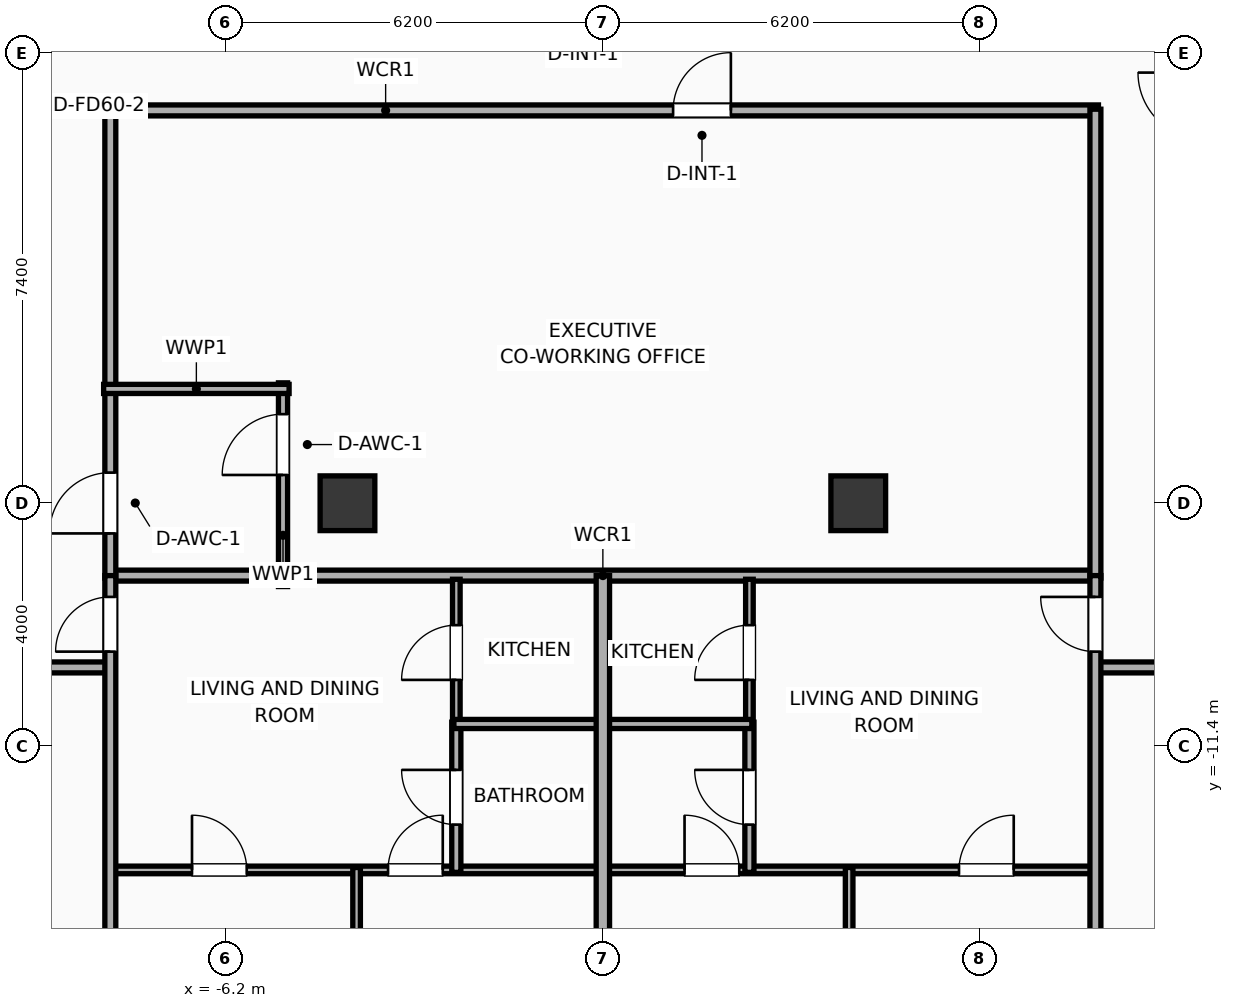
"""IFC4 building model, lengths in metres.
Left out: names, types, materials, properties, quantities, classifications, styles, units other than length and angle.
Written with IfcOpenShell. Run it as: python <this file> out.ifc"""

import sys

from ifc_helpers import new_model, si_unit, direction, frame, frame_2d, origin, origin_2d, place, context, subcontext, project, spatial, rectangle, extrude, element, fill, save


model = new_model("IFC4")
c1 = context("Model", 3, precision=1e-05, world=origin(), true_north=direction((0.0, 1.0)))
c2 = subcontext(c1, "Body", "Model", "MODEL_VIEW")
j1 = project(units=[si_unit("LENGTHUNIT", "METRE"), si_unit("PLANEANGLEUNIT", "RADIAN")], contexts=[c1])
p1 = place(None, origin())
s1 = spatial("IfcSite", under=j1, at=p1, CompositionType="ELEMENT")
p2 = place(p1, origin())
s2 = spatial("IfcBuilding", under=s1, at=p2, CompositionType="ELEMENT")
p3 = place(p2, frame((0.0, 0.0, 191.1)))
s3 = spatial("IfcBuildingStorey", under=s2, at=p3, CompositionType="ELEMENT", Elevation=191.1)
for number, where, z_axis, x_axis in (
    (1, (-4.2, -7.4, 0.0), (0.0, 0.0, 1.0), (1.0, 0.0, 0.0)),
    (2, (4.2, -7.4, 0.0), (0.0, 0.0, 1.0), (1.0, 0.0, 0.0)),
):
    element("IfcColumn", number, at=place(p3, frame(where, z_axis=z_axis, x_axis=x_axis)), inside=s3, PredefinedType="COLUMN", context=c2, shape_type="SweptSolid", body=[
        extrude(rectangle(XDim=0.9, YDim=0.9, at=origin_2d()), origin(), (0.0, 0.0, 1.0), 3.9),
    ])
p4 = place(p3, frame((-8.15, -8.59, 0.0), z_axis=(0.0, 0.0, 1.0), x_axis=(1.0, 0.0, 0.0)))
e3 = element("IfcWall", 3, at=p4, inside=s3, PredefinedType="PARTITIONING", context=c2, shape_type="SweptSolid", body=[
    extrude(rectangle(XDim=16.3, YDim=0.18, at=frame_2d((8.15, 0.0))), origin(), (0.0, 0.0, 1.0), 3.5),
])
p5 = place(p3, frame((-8.15, -0.94, 0.0), z_axis=(0.0, 0.0, 1.0), x_axis=(1.0, 0.0, 0.0)))
e4 = element("IfcWall", 4, at=p5, inside=s3, PredefinedType="PARTITIONING", context=c2, shape_type="SweptSolid", body=[
    extrude(rectangle(XDim=16.3, YDim=0.18, at=frame_2d((8.15, 0.0))), origin(), (0.0, 0.0, 1.0), 3.5),
])
p6 = place(p5, frame((9.305, 0.0, 0.0)))
e5 = element("IfcOpeningElement", 5, at=p6, cuts=e4, PredefinedType="OPENING", context=c2, shape_type="SweptSolid", body=[
    extrude(rectangle(XDim=0.95, YDim=2.05, at=frame_2d((0.475, 1.025))), frame((0.0, 0.1, 0.0), z_axis=(0.0, -1.0, 0.0), x_axis=(1.0, 0.0, 0.0)), (0.0, 0.0, 1.0), 0.2),
])
p7 = place(p3, frame((-8.1, -8.63, 0.0), z_axis=(0.0, 0.0, 1.0), x_axis=(0.0, 1.0, 0.0)))
e6 = element("IfcWall", 6, at=p7, inside=s3, PredefinedType="PARTITIONING", context=c2, shape_type="SweptSolid", body=[
    extrude(rectangle(XDim=7.71, YDim=0.18, at=frame_2d((3.855, 0.0))), origin(), (0.0, 0.0, 1.0), 3.5),
])
p8 = place(p7, frame((0.734, 0.0, 0.0)))
e7 = element("IfcOpeningElement", 7, at=p8, cuts=e6, PredefinedType="OPENING", context=c2, shape_type="SweptSolid", body=[
    extrude(rectangle(XDim=1.0, YDim=2.05, at=frame_2d((0.5, 1.025))), frame((0.0, 0.1, 0.0), z_axis=(0.0, -1.0, 0.0), x_axis=(1.0, 0.0, 0.0)), (0.0, 0.0, 1.0), 0.2),
])
p9 = place(p3, frame((8.1, -8.63, 0.0), z_axis=(0.0, 0.0, 1.0), x_axis=(0.0, 1.0, 0.0)))
e8 = element("IfcWall", 8, at=p9, inside=s3, PredefinedType="PARTITIONING", context=c2, shape_type="SweptSolid", body=[
    extrude(rectangle(XDim=7.71, YDim=0.18, at=frame_2d((3.855, 0.0))), origin(), (0.0, 0.0, 1.0), 3.5),
])
p10 = place(p3, frame((-5.26, -8.77, 0.0), z_axis=(0.0, 0.0, 1.0), x_axis=(0.0, 1.0, 0.0)))
e9 = element("IfcWall", 9, at=p10, inside=s3, PredefinedType="PLUMBINGWALL", context=c2, shape_type="SweptSolid", body=[
    extrude(rectangle(XDim=3.35, YDim=0.15, at=frame_2d((1.675, 0.0))), origin(), (0.0, 0.0, 1.0), 3.5),
])
p11 = place(p10, frame((1.835, 0.0, 0.0)))
e10 = element("IfcOpeningElement", 10, at=p11, cuts=e9, PredefinedType="OPENING", context=c2, shape_type="SweptSolid", body=[
    extrude(rectangle(XDim=1.0, YDim=2.05, at=frame_2d((0.5, 1.025))), frame((0.0, 0.085, 0.0), z_axis=(0.0, -1.0, 0.0), x_axis=(1.0, 0.0, 0.0)), (0.0, 0.0, 1.0), 0.17),
])
p12 = place(p3, frame((-8.21, -5.52, 0.0), z_axis=(0.0, 0.0, 1.0), x_axis=(1.0, 0.0, 0.0)))
e11 = element("IfcWall", 11, at=p12, inside=s3, PredefinedType="PLUMBINGWALL", context=c2, shape_type="SweptSolid", body=[
    extrude(rectangle(XDim=3.05, YDim=0.15, at=frame_2d((1.525, 0.0))), origin(), (0.0, 0.0, 1.0), 3.5),
])
p13 = place(p3, frame((-19.5, -10.1, 0.0), z_axis=(0.0, 0.0, 1.0), x_axis=(1.0, 0.0, 0.0)))
e12 = element("IfcWall", 12, at=p13, inside=s3, PredefinedType="PARTITIONING", context=c2, shape_type="SweptSolid", body=[
    extrude(rectangle(XDim=11.42, YDim=0.18, at=frame_2d((5.71, 0.0))), origin(), (0.0, 0.0, 1.0), 3.5),
])
p14 = place(p13, frame((2.623, 0.0, 0.0)))
e13 = element("IfcOpeningElement", 13, at=p14, cuts=e12, PredefinedType="OPENING", context=c2, shape_type="SweptSolid", body=[
    extrude(rectangle(XDim=0.9, YDim=2.05, at=frame_2d((0.45, 1.025))), frame((0.0, 0.1, 0.0), z_axis=(0.0, -1.0, 0.0), x_axis=(1.0, 0.0, 0.0)), (0.0, 0.0, 1.0), 0.2),
])
p15 = place(p13, frame((9.189, 0.0, 0.0)))
e14 = element("IfcOpeningElement", 14, at=p15, cuts=e12, PredefinedType="OPENING", context=c2, shape_type="SweptSolid", body=[
    extrude(rectangle(XDim=1.15, YDim=2.05, at=frame_2d((0.575, 1.025))), frame((0.0, 0.1, 0.0), z_axis=(0.0, -1.0, 0.0), x_axis=(1.0, 0.0, 0.0)), (0.0, 0.0, 1.0), 0.2),
])
p16 = place(p3, frame((8.08, -10.1, 0.0), z_axis=(0.0, 0.0, 1.0), x_axis=(1.0, 0.0, 0.0)))
e15 = element("IfcWall", 15, at=p16, inside=s3, PredefinedType="PARTITIONING", context=c2, shape_type="SweptSolid", body=[
    extrude(rectangle(XDim=11.42, YDim=0.18, at=frame_2d((5.71, 0.0))), origin(), (0.0, 0.0, 1.0), 3.5),
])
p17 = place(p16, frame((1.175, 0.0, 0.0)))
e16 = element("IfcOpeningElement", 16, at=p17, cuts=e15, PredefinedType="OPENING", context=c2, shape_type="SweptSolid", body=[
    extrude(rectangle(XDim=1.15, YDim=2.05, at=frame_2d((0.575, 1.025))), frame((0.0, 0.1, 0.0), z_axis=(0.0, -1.0, 0.0), x_axis=(1.0, 0.0, 0.0)), (0.0, 0.0, 1.0), 0.2),
])
p18 = place(p16, frame((6.87, 0.0, 0.0)))
e17 = element("IfcOpeningElement", 17, at=p18, cuts=e15, PredefinedType="OPENING", context=c2, shape_type="SweptSolid", body=[
    extrude(rectangle(XDim=1.15, YDim=2.05, at=frame_2d((0.575, 1.025))), frame((0.0, 0.1, 0.0), z_axis=(0.0, -1.0, 0.0), x_axis=(1.0, 0.0, 0.0)), (0.0, 0.0, 1.0), 0.2),
])
p19 = place(p3, frame((-8.08, -13.43, 0.0), z_axis=(0.0, 0.0, 1.0), x_axis=(1.0, 0.0, 0.0)))
e18 = element("IfcWall", 18, at=p19, inside=s3, PredefinedType="PARTITIONING", context=c2, shape_type="SweptSolid", body=[
    extrude(rectangle(XDim=8.06, YDim=0.125, at=frame_2d((4.03, 0.0))), origin(), (0.0, 0.0, 1.0), 3.5),
])
p20 = place(p19, frame((1.323, 0.0, 0.0)))
e19 = element("IfcOpeningElement", 19, at=p20, cuts=e18, PredefinedType="OPENING", context=c2, shape_type="SweptSolid", body=[
    extrude(rectangle(XDim=0.9, YDim=2.05, at=frame_2d((0.45, 1.025))), frame((0.0, 0.073, 0.0), z_axis=(0.0, -1.0, 0.0), x_axis=(1.0, 0.0, 0.0)), (0.0, 0.0, 1.0), 0.145),
])
p21 = place(p19, frame((4.547, 0.0, 0.0)))
e20 = element("IfcOpeningElement", 20, at=p21, cuts=e18, PredefinedType="OPENING", context=c2, shape_type="SweptSolid", body=[
    extrude(rectangle(XDim=0.9, YDim=2.05, at=frame_2d((0.45, 1.025))), frame((0.0, 0.073, 0.0), z_axis=(0.0, -1.0, 0.0), x_axis=(1.0, 0.0, 0.0)), (0.0, 0.0, 1.0), 0.145),
])
p22 = place(p3, frame((-2.41, -11.06, 0.0), z_axis=(0.0, 0.0, 1.0), x_axis=(0.0, 1.0, 0.0)))
e21 = element("IfcWall", 21, at=p22, inside=s3, PredefinedType="PARTITIONING", context=c2, shape_type="SweptSolid", body=[
    extrude(rectangle(XDim=2.41, YDim=0.125, at=frame_2d((1.205, 0.0))), origin(), (0.0, 0.0, 1.0), 3.5),
])
p23 = place(p22, frame((0.755, 0.0, 0.0)))
e22 = element("IfcOpeningElement", 22, at=p23, cuts=e21, PredefinedType="OPENING", context=c2, shape_type="SweptSolid", body=[
    extrude(rectangle(XDim=0.9, YDim=2.05, at=frame_2d((0.45, 1.025))), frame((0.0, 0.073, 0.0), z_axis=(0.0, -1.0, 0.0), x_axis=(1.0, 0.0, 0.0)), (0.0, 0.0, 1.0), 0.145),
])
p24 = place(p3, frame((-2.41, -13.47, 0.0), z_axis=(0.0, 0.0, 1.0), x_axis=(0.0, 1.0, 0.0)))
e23 = element("IfcWall", 23, at=p24, inside=s3, PredefinedType="PLUMBINGWALL", context=c2, shape_type="SweptSolid", body=[
    extrude(rectangle(XDim=2.47, YDim=0.15, at=frame_2d((1.235, 0.0))), origin(), (0.0, 0.0, 1.0), 3.5),
])
p25 = place(p24, frame((0.785, 0.0, 0.0)))
e24 = element("IfcOpeningElement", 24, at=p25, cuts=e23, PredefinedType="OPENING", context=c2, shape_type="SweptSolid", body=[
    extrude(rectangle(XDim=0.9, YDim=2.05, at=frame_2d((0.45, 1.025))), frame((0.0, 0.085, 0.0), z_axis=(0.0, -1.0, 0.0), x_axis=(1.0, 0.0, 0.0)), (0.0, 0.0, 1.0), 0.17),
])
p26 = place(p3, frame((-2.45, -11.03, 0.0), z_axis=(0.0, 0.0, 1.0), x_axis=(1.0, 0.0, 0.0)))
e25 = element("IfcWall", 25, at=p26, inside=s3, PredefinedType="PLUMBINGWALL", context=c2, shape_type="SweptSolid", body=[
    extrude(rectangle(XDim=2.43, YDim=0.15, at=frame_2d((1.215, 0.0))), origin(), (0.0, 0.0, 1.0), 3.5),
])
p27 = place(p3, frame((-4.05, -21.031, 0.0), z_axis=(0.0, 0.0, 1.0), x_axis=(0.0, 1.0, 0.0)))
e26 = element("IfcWall", 26, at=p27, inside=s3, PredefinedType="PARTITIONING", context=c2, shape_type="SweptSolid", body=[
    extrude(rectangle(XDim=7.641, YDim=0.125, at=frame_2d((3.82, 0.0))), origin(), (0.0, 0.0, 1.0), 2.39),
])
p28 = place(p3, frame((-8.1, -21.456, 0.0), z_axis=(0.0, 0.0, 1.0), x_axis=(0.0, 1.0, 0.0)))
e27 = element("IfcWall", 27, at=p28, inside=s3, PredefinedType="PARTITIONING", context=c2, shape_type="SweptSolid", body=[
    extrude(rectangle(XDim=12.866, YDim=0.18, at=frame_2d((6.433, 0.0))), origin(), (0.0, 0.0, 1.0), 3.5),
])
p29 = place(p28, frame((11.616, 0.0, 0.0)))
e28 = element("IfcOpeningElement", 28, at=p29, cuts=e27, PredefinedType="OPENING", context=c2, shape_type="SweptSolid", body=[
    extrude(rectangle(XDim=0.9, YDim=2.05, at=frame_2d((0.45, 1.025))), frame((0.0, 0.1, 0.0), z_axis=(0.0, -1.0, 0.0), x_axis=(1.0, 0.0, 0.0)), (0.0, 0.0, 1.0), 0.2),
])
p30 = place(p3, frame((0.02, -13.43, 0.0), z_axis=(0.0, 0.0, 1.0), x_axis=(1.0, 0.0, 0.0)))
e29 = element("IfcWall", 29, at=p30, inside=s3, PredefinedType="PARTITIONING", context=c2, shape_type="SweptSolid", body=[
    extrude(rectangle(XDim=8.06, YDim=0.125, at=frame_2d((4.03, 0.0))), origin(), (0.0, 0.0, 1.0), 3.5),
])
p31 = place(p30, frame((1.323, 0.0, 0.0)))
e30 = element("IfcOpeningElement", 30, at=p31, cuts=e29, PredefinedType="OPENING", context=c2, shape_type="SweptSolid", body=[
    extrude(rectangle(XDim=0.9, YDim=2.05, at=frame_2d((0.45, 1.025))), frame((0.0, 0.073, 0.0), z_axis=(0.0, -1.0, 0.0), x_axis=(1.0, 0.0, 0.0)), (0.0, 0.0, 1.0), 0.145),
])
p32 = place(p30, frame((5.837, 0.0, 0.0)))
e31 = element("IfcOpeningElement", 31, at=p32, cuts=e29, PredefinedType="OPENING", context=c2, shape_type="SweptSolid", body=[
    extrude(rectangle(XDim=0.9, YDim=2.05, at=frame_2d((0.45, 1.025))), frame((0.0, 0.073, 0.0), z_axis=(0.0, -1.0, 0.0), x_axis=(1.0, 0.0, 0.0)), (0.0, 0.0, 1.0), 0.145),
])
p33 = place(p3, frame((2.41, -11.06, 0.0), z_axis=(0.0, 0.0, 1.0), x_axis=(0.0, 1.0, 0.0)))
e32 = element("IfcWall", 32, at=p33, inside=s3, PredefinedType="PARTITIONING", context=c2, shape_type="SweptSolid", body=[
    extrude(rectangle(XDim=2.41, YDim=0.125, at=frame_2d((1.205, 0.0))), origin(), (0.0, 0.0, 1.0), 3.5),
])
p34 = place(p33, frame((0.755, 0.0, 0.0)))
e33 = element("IfcOpeningElement", 33, at=p34, cuts=e32, PredefinedType="OPENING", context=c2, shape_type="SweptSolid", body=[
    extrude(rectangle(XDim=0.9, YDim=2.05, at=frame_2d((0.45, 1.025))), frame((0.0, 0.073, 0.0), z_axis=(0.0, -1.0, 0.0), x_axis=(1.0, 0.0, 0.0)), (0.0, 0.0, 1.0), 0.145),
])
p35 = place(p3, frame((2.41, -13.47, 0.0), z_axis=(0.0, 0.0, 1.0), x_axis=(0.0, 1.0, 0.0)))
e34 = element("IfcWall", 34, at=p35, inside=s3, PredefinedType="PLUMBINGWALL", context=c2, shape_type="SweptSolid", body=[
    extrude(rectangle(XDim=2.47, YDim=0.15, at=frame_2d((1.235, 0.0))), origin(), (0.0, 0.0, 1.0), 3.5),
])
p36 = place(p35, frame((0.785, 0.0, 0.0)))
e35 = element("IfcOpeningElement", 35, at=p36, cuts=e34, PredefinedType="OPENING", context=c2, shape_type="SweptSolid", body=[
    extrude(rectangle(XDim=0.9, YDim=2.05, at=frame_2d((0.45, 1.025))), frame((0.0, 0.085, 0.0), z_axis=(0.0, -1.0, 0.0), x_axis=(1.0, 0.0, 0.0)), (0.0, 0.0, 1.0), 0.17),
])
p37 = place(p3, frame((0.02, -11.03, 0.0), z_axis=(0.0, 0.0, 1.0), x_axis=(1.0, 0.0, 0.0)))
e36 = element("IfcWall", 36, at=p37, inside=s3, PredefinedType="PLUMBINGWALL", context=c2, shape_type="SweptSolid", body=[
    extrude(rectangle(XDim=2.43, YDim=0.15, at=frame_2d((1.215, 0.0))), origin(), (0.0, 0.0, 1.0), 3.5),
])
p38 = place(p3, frame((4.05, -20.179, 0.0), z_axis=(0.0, 0.0, 1.0), x_axis=(0.0, 1.0, 0.0)))
e37 = element("IfcWall", 37, at=p38, inside=s3, PredefinedType="PARTITIONING", context=c2, shape_type="SweptSolid", body=[
    extrude(rectangle(XDim=6.79, YDim=0.125, at=frame_2d((3.395, 0.0))), origin(), (0.0, 0.0, 1.0), 2.39),
])
p39 = place(p3, frame((8.1, -19.754, 0.0), z_axis=(0.0, 0.0, 1.0), x_axis=(0.0, 1.0, 0.0)))
e38 = element("IfcWall", 38, at=p39, inside=s3, PredefinedType="PARTITIONING", context=c2, shape_type="SweptSolid", body=[
    extrude(rectangle(XDim=11.164, YDim=0.18, at=frame_2d((5.582, 0.0))), origin(), (0.0, 0.0, 1.0), 3.5),
])
p40 = place(p39, frame((9.913, 0.0, 0.0)))
e39 = element("IfcOpeningElement", 39, at=p40, cuts=e38, PredefinedType="OPENING", context=c2, shape_type="SweptSolid", body=[
    extrude(rectangle(XDim=0.9, YDim=2.05, at=frame_2d((0.45, 1.025))), frame((0.0, 0.1, 0.0), z_axis=(0.0, -1.0, 0.0), x_axis=(1.0, 0.0, 0.0)), (0.0, 0.0, 1.0), 0.2),
])
p41 = place(p3, frame((0.0, -20.605, 0.0), z_axis=(0.0, 0.0, 1.0), x_axis=(0.0, 1.0, 0.0)))
e40 = element("IfcWall", 40, at=p41, inside=s3, PredefinedType="PARTITIONING", context=c2, shape_type="SweptSolid", body=[
    extrude(rectangle(XDim=12.015, YDim=0.22, at=frame_2d((6.007, 0.0))), origin(), (0.0, 0.0, 1.0), 3.5),
])
p42 = place(p6, origin())
e41 = element("IfcDoor", 41, at=p42, inside=s3, OperationType="SINGLE_SWING_RIGHT", PredefinedType="DOOR", context=c2, shape_type="SweptSolid", body=[
    extrude(rectangle(XDim=0.95, YDim=2.05, at=frame_2d((0.475, 1.025))), frame((0.0, 0.025, 0.0), z_axis=(0.0, -1.0, 0.0), x_axis=(1.0, 0.0, 0.0)), (0.0, 0.0, 1.0), 0.05),
])
fill(e5, e41)
p43 = place(p8, origin())
e42 = element("IfcDoor", 42, at=p43, inside=s3, OperationType="SINGLE_SWING_LEFT", PredefinedType="DOOR", context=c2, shape_type="SweptSolid", body=[
    extrude(rectangle(XDim=1.0, YDim=2.05, at=frame_2d((0.5, 1.025))), frame((0.0, 0.025, 0.0), z_axis=(0.0, -1.0, 0.0), x_axis=(1.0, 0.0, 0.0)), (0.0, 0.0, 1.0), 0.05),
])
fill(e7, e42)
p44 = place(p11, origin())
e43 = element("IfcDoor", 43, at=p44, inside=s3, OperationType="SINGLE_SWING_LEFT", PredefinedType="DOOR", context=c2, shape_type="SweptSolid", body=[
    extrude(rectangle(XDim=1.0, YDim=2.05, at=frame_2d((0.5, 1.025))), frame((0.0, 0.025, 0.0), z_axis=(0.0, -1.0, 0.0), x_axis=(1.0, 0.0, 0.0)), (0.0, 0.0, 1.0), 0.05),
])
fill(e10, e43)
p45 = place(p20, origin())
e44 = element("IfcDoor", 44, at=p45, inside=s3, OperationType="SINGLE_SWING_LEFT", PredefinedType="DOOR", context=c2, shape_type="SweptSolid", body=[
    extrude(rectangle(XDim=0.9, YDim=2.05, at=frame_2d((0.45, 1.025))), frame((0.0, 0.025, 0.0), z_axis=(0.0, -1.0, 0.0), x_axis=(1.0, 0.0, 0.0)), (0.0, 0.0, 1.0), 0.05),
])
fill(e19, e44)
p46 = place(p21, origin())
e45 = element("IfcDoor", 45, at=p46, inside=s3, OperationType="SINGLE_SWING_RIGHT", PredefinedType="DOOR", context=c2, shape_type="SweptSolid", body=[
    extrude(rectangle(XDim=0.9, YDim=2.05, at=frame_2d((0.45, 1.025))), frame((0.0, 0.025, 0.0), z_axis=(0.0, -1.0, 0.0), x_axis=(1.0, 0.0, 0.0)), (0.0, 0.0, 1.0), 0.05),
])
fill(e20, e45)
p47 = place(p23, origin())
e46 = element("IfcDoor", 46, at=p47, inside=s3, OperationType="SINGLE_SWING_LEFT", PredefinedType="DOOR", context=c2, shape_type="SweptSolid", body=[
    extrude(rectangle(XDim=0.9, YDim=2.05, at=frame_2d((0.45, 1.025))), frame((0.0, 0.025, 0.0), z_axis=(0.0, -1.0, 0.0), x_axis=(1.0, 0.0, 0.0)), (0.0, 0.0, 1.0), 0.05),
])
fill(e22, e46)
p48 = place(p25, origin())
e47 = element("IfcDoor", 47, at=p48, inside=s3, OperationType="SINGLE_SWING_RIGHT", PredefinedType="DOOR", context=c2, shape_type="SweptSolid", body=[
    extrude(rectangle(XDim=0.9, YDim=2.05, at=frame_2d((0.45, 1.025))), frame((0.0, 0.025, 0.0), z_axis=(0.0, -1.0, 0.0), x_axis=(1.0, 0.0, 0.0)), (0.0, 0.0, 1.0), 0.05),
])
fill(e24, e47)
p49 = place(p29, origin())
e48 = element("IfcDoor", 48, at=p49, inside=s3, OperationType="SINGLE_SWING_LEFT", PredefinedType="DOOR", context=c2, shape_type="SweptSolid", body=[
    extrude(rectangle(XDim=0.9, YDim=2.05, at=frame_2d((0.45, 1.025))), frame((0.0, 0.025, 0.0), z_axis=(0.0, -1.0, 0.0), x_axis=(1.0, 0.0, 0.0)), (0.0, 0.0, 1.0), 0.05),
])
fill(e28, e48)
p50 = place(p31, origin())
e49 = element("IfcDoor", 49, at=p50, inside=s3, OperationType="SINGLE_SWING_LEFT", PredefinedType="DOOR", context=c2, shape_type="SweptSolid", body=[
    extrude(rectangle(XDim=0.9, YDim=2.05, at=frame_2d((0.45, 1.025))), frame((0.0, 0.025, 0.0), z_axis=(0.0, -1.0, 0.0), x_axis=(1.0, 0.0, 0.0)), (0.0, 0.0, 1.0), 0.05),
])
fill(e30, e49)
p51 = place(p32, origin())
e50 = element("IfcDoor", 50, at=p51, inside=s3, OperationType="SINGLE_SWING_RIGHT", PredefinedType="DOOR", context=c2, shape_type="SweptSolid", body=[
    extrude(rectangle(XDim=0.9, YDim=2.05, at=frame_2d((0.45, 1.025))), frame((0.0, 0.025, 0.0), z_axis=(0.0, -1.0, 0.0), x_axis=(1.0, 0.0, 0.0)), (0.0, 0.0, 1.0), 0.05),
])
fill(e31, e50)
p52 = place(p34, origin())
e51 = element("IfcDoor", 51, at=p52, inside=s3, OperationType="SINGLE_SWING_LEFT", PredefinedType="DOOR", context=c2, shape_type="SweptSolid", body=[
    extrude(rectangle(XDim=0.9, YDim=2.05, at=frame_2d((0.45, 1.025))), frame((0.0, 0.025, 0.0), z_axis=(0.0, -1.0, 0.0), x_axis=(1.0, 0.0, 0.0)), (0.0, 0.0, 1.0), 0.05),
])
fill(e33, e51)
p53 = place(p36, origin())
e52 = element("IfcDoor", 52, at=p53, inside=s3, OperationType="SINGLE_SWING_RIGHT", PredefinedType="DOOR", context=c2, shape_type="SweptSolid", body=[
    extrude(rectangle(XDim=0.9, YDim=2.05, at=frame_2d((0.45, 1.025))), frame((0.0, 0.025, 0.0), z_axis=(0.0, -1.0, 0.0), x_axis=(1.0, 0.0, 0.0)), (0.0, 0.0, 1.0), 0.05),
])
fill(e35, e52)
p54 = place(p40, origin())
e53 = element("IfcDoor", 53, at=p54, inside=s3, OperationType="SINGLE_SWING_RIGHT", PredefinedType="DOOR", context=c2, shape_type="SweptSolid", body=[
    extrude(rectangle(XDim=0.9, YDim=2.05, at=frame_2d((0.45, 1.025))), frame((0.0, 0.025, 0.0), z_axis=(0.0, -1.0, 0.0), x_axis=(1.0, 0.0, 0.0)), (0.0, 0.0, 1.0), 0.05),
])
fill(e39, e53)
save(model, sys.argv[1])
